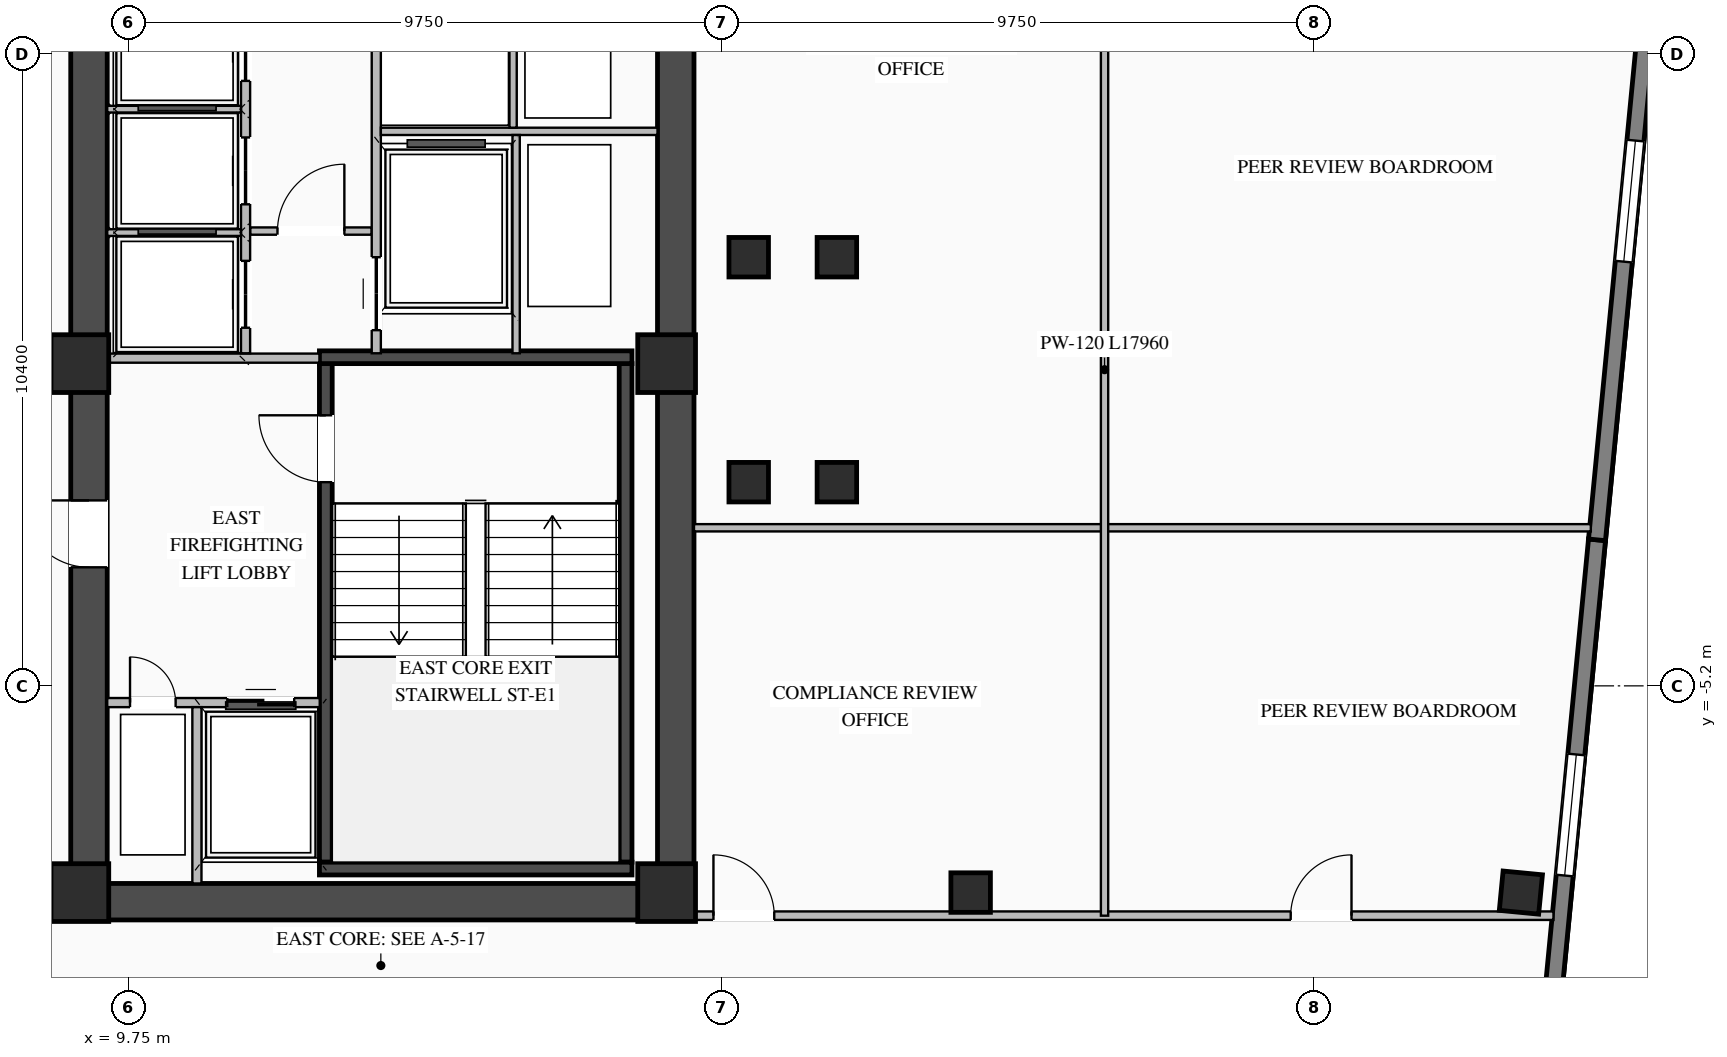
"""IFC4 building model, lengths in metres.
Left out: names, types, materials, properties, quantities, classifications, styles, units other than length and angle.
Written with IfcOpenShell. Run it as: python <this file> out.ifc"""

import sys

from ifc_helpers import new_model, si_unit, direction, frame, frame_2d, origin, origin_2d, place, context, subcontext, project, spatial, rectangle, i_section, extrude, element, fill, save


model = new_model("IFC4")
c1 = context("Model", 3, precision=1e-05, world=origin(), true_north=direction((0.0, 1.0)))
c2 = subcontext(c1, "Body", "Model", "MODEL_VIEW")
j1 = project(units=[si_unit("LENGTHUNIT", "METRE"), si_unit("PLANEANGLEUNIT", "RADIAN")], contexts=[c1])
p1 = place(None, origin())
s1 = spatial("IfcSite", under=j1, at=p1, CompositionType="ELEMENT")
p2 = place(p1, origin())
s2 = spatial("IfcBuilding", under=s1, at=p2, CompositionType="ELEMENT")
p3 = place(p2, frame((0.0, 0.0, 188.0)))
s3 = spatial("IfcBuildingStorey", under=s2, at=p3, CompositionType="ELEMENT", Elevation=188.0)
p4 = place(p3, frame((8.8, -8.75, 0.0), z_axis=(0.0, 0.0, 1.0), x_axis=(1.0, 0.0, 0.0)))
e1 = element("IfcWall", 1, at=p4, inside=s3, PredefinedType="SHEAR", context=c2, shape_type="SweptSolid", body=[
    extrude(rectangle(XDim=10.25, YDim=0.6, at=frame_2d((5.125, 0.0))), origin(), (0.0, 0.0, 1.0), 3.27),
])
p5 = place(p3, frame((9.1, -8.45, 0.0), z_axis=(0.0, 0.0, 1.0), x_axis=(0.0, 1.0, 0.0)))
e2 = element("IfcWall", 2, at=p5, inside=s3, PredefinedType="SHEAR", context=c2, shape_type="SweptSolid", body=[
    extrude(rectangle(XDim=16.9, YDim=0.6, at=frame_2d((8.45, 0.0))), origin(), (0.0, 0.0, 1.0), 3.27),
])
p6 = place(p5, frame((5.2, 0.0, 0.0)))
e3 = element("IfcOpeningElement", 3, at=p6, cuts=e2, PredefinedType="OPENING", context=c2, shape_type="SweptSolid", body=[
    extrude(rectangle(XDim=1.1, YDim=2.08, at=frame_2d((0.55, 1.04))), frame((0.0, 0.31, 0.0), z_axis=(0.0, -1.0, 0.0), x_axis=(1.0, 0.0, 0.0)), (0.0, 0.0, 1.0), 0.62),
])
p7 = place(p3, frame((18.75, -8.45, 0.0), z_axis=(0.0, 0.0, 1.0), x_axis=(0.0, 1.0, 0.0)))
e4 = element("IfcWall", 4, at=p7, inside=s3, PredefinedType="SHEAR", context=c2, shape_type="SweptSolid", body=[
    extrude(rectangle(XDim=16.9, YDim=0.6, at=frame_2d((8.45, 0.0))), origin(), (0.0, 0.0, 1.0), 3.27),
])
p8 = place(p3, frame((12.995, -8.1, 0.0), z_axis=(0.0, 0.0, 1.0), x_axis=(0.0, 1.0, 0.0)))
e5 = element("IfcWall", 5, at=p8, inside=s3, PredefinedType="SHEAR", context=c2, shape_type="SweptSolid", body=[
    extrude(rectangle(XDim=8.2, YDim=0.21, at=frame_2d((4.1, 0.0))), origin(), (0.0, 0.0, 1.0), 3.27),
])
p9 = place(p8, frame((6.25, 0.0, 0.0)))
e6 = element("IfcOpeningElement", 6, at=p9, cuts=e5, PredefinedType="OPENING", context=c2, shape_type="SweptSolid", body=[
    extrude(rectangle(XDim=1.1, YDim=2.15, at=frame_2d((0.55, 1.075))), frame((0.0, 0.115, 0.0), z_axis=(0.0, -1.0, 0.0), x_axis=(1.0, 0.0, 0.0)), (0.0, 0.0, 1.0), 0.23),
])
p10 = place(p3, frame((17.925, -8.1, 0.0), z_axis=(0.0, 0.0, 1.0), x_axis=(0.0, 1.0, 0.0)))
e7 = element("IfcWall", 7, at=p10, inside=s3, PredefinedType="SHEAR", context=c2, shape_type="SweptSolid", body=[
    extrude(rectangle(XDim=8.2, YDim=0.21, at=frame_2d((4.1, 0.0))), origin(), (0.0, 0.0, 1.0), 3.27),
])
for number, where, z_axis, x_axis in (
    (8, (12.89, -8.205, 0.0), (0.0, 0.0, 1.0), (1.0, 0.0, 0.0)),
    (9, (18.03, 0.205, 0.0), (0.0, 0.0, 1.0), (-1.0, 0.0, 0.0)),
):
    element("IfcWall", number, at=place(p3, frame(where, z_axis=z_axis, x_axis=x_axis)), inside=s3, PredefinedType="SHEAR", context=c2, shape_type="SweptSolid", body=[
        extrude(rectangle(XDim=5.14, YDim=0.21, at=frame_2d((2.57, 0.0))), origin(), (0.0, 0.0, 1.0), 3.27),
    ])
for number, where, z_axis, x_axis in (
    (10, (8.95, -8.6, 0.0), (0.0, 0.0, 1.0), (1.0, 0.0, 0.0)),
    (11, (8.95, 0.1, 0.0), (0.0, 0.0, 1.0), (1.0, 0.0, 0.0)),
    (12, (18.6, -8.6, 0.0), (0.0, 0.0, 1.0), (1.0, 0.0, 0.0)),
    (13, (18.6, 0.1, 0.0), (0.0, 0.0, 1.0), (1.0, 0.0, 0.0)),
):
    element("IfcColumn", number, at=place(p3, frame(where, z_axis=z_axis, x_axis=x_axis)), inside=s3, PredefinedType="COLUMN", context=c2, shape_type="SweptSolid", body=[
        extrude(rectangle(XDim=0.95, YDim=0.95, at=origin_2d()), origin(), (0.0, 0.0, 1.0), 3.45),
    ])
for number, where, z_axis, x_axis in (
    (14, (19.95, -1.85, 0.0), (0.0, 0.0, 1.0), (1.0, 0.0, 0.0)),
    (15, (19.95, 1.85, 0.0), (0.0, 0.0, 1.0), (1.0, 0.0, 0.0)),
    (16, (21.4, -1.85, 0.0), (0.0, 0.0, 1.0), (1.0, 0.0, 0.0)),
    (17, (21.4, 1.85, 0.0), (0.0, 0.0, 1.0), (1.0, 0.0, 0.0)),
    (18, (23.6, -8.6, 0.0), (0.0, 0.0, 1.0), (1.0, 0.0, 0.0)),
    (19, (32.649, -8.6, 0.0), (0.0, 0.0, 1.0), (0.995, -0.096, 0.0)),
):
    element("IfcColumn", number, at=place(p3, frame(where, z_axis=z_axis, x_axis=x_axis)), inside=s3, PredefinedType="COLUMN", context=c2, shape_type="SweptSolid", body=[
        extrude(i_section(OverallWidth=0.65, OverallDepth=0.65, WebThickness=0.028, FlangeThickness=0.04, at=origin_2d()), origin(), (0.0, 0.0, 1.0), 3.45),
    ])
p11 = place(p3, frame((33.901, -2.798, 0.0), z_axis=(0.0, 0.0, 1.0), x_axis=(-0.095853434568, -0.99539545864, 0.0)))
e20 = element("IfcWall", 20, at=p11, inside=s3, PredefinedType="STANDARD", context=c2, shape_type="SweptSolid", body=[
    extrude(rectangle(XDim=16.79, YDim=0.28, at=frame_2d((8.395, 0.0))), origin(), (0.0, 0.0, 1.0), 3.25),
])
p12 = place(p11, frame((3.547, 0.0, 0.76)))
e21 = element("IfcOpeningElement", 21, at=p12, cuts=e20, PredefinedType="OPENING", context=c2, shape_type="SweptSolid", body=[
    extrude(rectangle(XDim=2.0, YDim=2.05, at=frame_2d((1.0, 1.025))), frame((0.0, 0.15, 0.0), z_axis=(0.0, -1.0, 0.0), x_axis=(1.0, 0.0, 0.0)), (0.0, 0.0, 1.0), 0.3),
])
p13 = place(p11, frame((10.193, 0.0, 0.76)))
e22 = element("IfcOpeningElement", 22, at=p13, cuts=e20, PredefinedType="OPENING", context=c2, shape_type="SweptSolid", body=[
    extrude(rectangle(XDim=2.0, YDim=2.05, at=frame_2d((1.0, 1.025))), frame((0.0, 0.15, 0.0), z_axis=(0.0, -1.0, 0.0), x_axis=(1.0, 0.0, 0.0)), (0.0, 0.0, 1.0), 0.3),
])
p14 = place(p3, frame((35.51, 13.914, 0.0), z_axis=(0.0, 0.0, 1.0), x_axis=(-0.095839027265, -0.995396845913, 0.0)))
e23 = element("IfcWall", 23, at=p14, inside=s3, PredefinedType="STANDARD", context=c2, shape_type="SweptSolid", body=[
    extrude(rectangle(XDim=16.79, YDim=0.28, at=frame_2d((8.395, 0.0))), origin(), (0.0, 0.0, 1.0), 3.25),
])
p15 = place(p14, frame((5.647, 0.0, 0.76)))
e24 = element("IfcOpeningElement", 24, at=p15, cuts=e23, PredefinedType="OPENING", context=c2, shape_type="SweptSolid", body=[
    extrude(rectangle(XDim=2.0, YDim=2.05, at=frame_2d((1.0, 1.025))), frame((0.0, 0.15, 0.0), z_axis=(0.0, -1.0, 0.0), x_axis=(1.0, 0.0, 0.0)), (0.0, 0.0, 1.0), 0.3),
])
p16 = place(p14, frame((10.193, 0.0, 0.76)))
e25 = element("IfcOpeningElement", 25, at=p16, cuts=e23, PredefinedType="OPENING", context=c2, shape_type="SweptSolid", body=[
    extrude(rectangle(XDim=2.0, YDim=2.05, at=frame_2d((1.0, 1.025))), frame((0.0, 0.15, 0.0), z_axis=(0.0, -1.0, 0.0), x_axis=(1.0, 0.0, 0.0)), (0.0, 0.0, 1.0), 0.3),
])
p17 = place(p3, frame((9.4, -5.475, 0.0), z_axis=(0.0, 0.0, 1.0), x_axis=(1.0, 0.0, 0.0)))
e26 = element("IfcWall", 26, at=p17, inside=s3, PredefinedType="STANDARD", context=c2, shape_type="SweptSolid", body=[
    extrude(rectangle(XDim=3.495, YDim=0.15, at=frame_2d((1.748, 0.0))), origin(), (0.0, 0.0, 1.0), 3.25),
])
p18 = place(p17, frame((1.975, 0.0, 0.0)))
e27 = element("IfcOpeningElement", 27, at=p18, cuts=e26, PredefinedType="OPENING", context=c2, shape_type="SweptSolid", body=[
    extrude(rectangle(XDim=1.1, YDim=2.15, at=frame_2d((0.55, 1.075))), frame((0.0, 0.085, 0.0), z_axis=(0.0, -1.0, 0.0), x_axis=(1.0, 0.0, 0.0)), (0.0, 0.0, 1.0), 0.17),
])
p19 = place(p17, frame((0.375, 0.0, 0.0)))
e28 = element("IfcOpeningElement", 28, at=p19, cuts=e26, PredefinedType="OPENING", context=c2, shape_type="SweptSolid", body=[
    extrude(rectangle(XDim=0.75, YDim=2.05, at=frame_2d((0.375, 1.025))), frame((0.0, 0.085, 0.0), z_axis=(0.0, -1.0, 0.0), x_axis=(1.0, 0.0, 0.0)), (0.0, 0.0, 1.0), 0.17),
])
p20 = place(p3, frame((10.875, -8.45, 0.0), z_axis=(0.0, 0.0, 1.0), x_axis=(0.0, 1.0, 0.0)))
e29 = element("IfcWall", 29, at=p20, inside=s3, PredefinedType="STANDARD", context=c2, shape_type="SweptSolid", body=[
    extrude(rectangle(XDim=2.9, YDim=0.15, at=frame_2d((1.45, 0.0))), origin(), (0.0, 0.0, 1.0), 3.25),
])
p21 = place(p3, frame((9.4, 0.19, 0.0), z_axis=(0.0, 0.0, 1.0), x_axis=(1.0, 0.0, 0.0)))
e30 = element("IfcWall", 30, at=p21, inside=s3, PredefinedType="STANDARD", context=c2, shape_type="SweptSolid", body=[
    extrude(rectangle(XDim=3.49, YDim=0.15, at=frame_2d((1.745, 0.0))), origin(), (0.0, 0.0, 1.0), 2.645),
])
p22 = place(p3, frame((11.75, 2.28, 0.0), z_axis=(0.0, 0.0, 1.0), x_axis=(1.0, 0.0, 0.0)))
e31 = element("IfcWall", 31, at=p22, inside=s3, PredefinedType="STANDARD", context=c2, shape_type="SweptSolid", body=[
    extrude(rectangle(XDim=2.0, YDim=0.12, at=frame_2d((1.0, 0.0))), origin(), (0.0, 0.0, 1.0), 3.25),
])
p23 = place(p22, frame((0.45, 0.0, 0.0)))
e32 = element("IfcOpeningElement", 32, at=p23, cuts=e31, PredefinedType="OPENING", context=c2, shape_type="SweptSolid", body=[
    extrude(rectangle(XDim=1.1, YDim=2.1, at=frame_2d((0.55, 1.05))), frame((0.0, 0.07, 0.0), z_axis=(0.0, -1.0, 0.0), x_axis=(1.0, 0.0, 0.0)), (0.0, 0.0, 1.0), 0.14),
])
p24 = place(p3, frame((11.675, 0.27, 0.0), z_axis=(0.0, 0.0, 1.0), x_axis=(0.0, 1.0, 0.0)))
e33 = element("IfcWall", 33, at=p24, inside=s3, PredefinedType="STANDARD", context=c2, shape_type="SweptSolid", body=[
    extrude(rectangle(XDim=8.18, YDim=0.15, at=frame_2d((4.09, 0.0))), origin(), (0.0, 0.0, 1.0), 3.25),
])
p25 = place(p24, frame((0.42, 0.0, 0.0)))
e34 = element("IfcOpeningElement", 34, at=p25, cuts=e33, PredefinedType="OPENING", context=c2, shape_type="SweptSolid", body=[
    extrude(rectangle(XDim=1.1, YDim=2.1, at=frame_2d((0.55, 1.05))), frame((0.0, 0.085, 0.0), z_axis=(0.0, -1.0, 0.0), x_axis=(1.0, 0.0, 0.0)), (0.0, 0.0, 1.0), 0.17),
])
p26 = place(p24, frame((2.45, 0.0, 0.0)))
e35 = element("IfcOpeningElement", 35, at=p26, cuts=e33, PredefinedType="OPENING", context=c2, shape_type="SweptSolid", body=[
    extrude(rectangle(XDim=1.1, YDim=2.1, at=frame_2d((0.55, 1.05))), frame((0.0, 0.085, 0.0), z_axis=(0.0, -1.0, 0.0), x_axis=(1.0, 0.0, 0.0)), (0.0, 0.0, 1.0), 0.17),
])
p27 = place(p24, frame((4.48, 0.0, 0.0)))
e36 = element("IfcOpeningElement", 36, at=p27, cuts=e33, PredefinedType="OPENING", context=c2, shape_type="SweptSolid", body=[
    extrude(rectangle(XDim=1.1, YDim=2.1, at=frame_2d((0.55, 1.05))), frame((0.0, 0.085, 0.0), z_axis=(0.0, -1.0, 0.0), x_axis=(1.0, 0.0, 0.0)), (0.0, 0.0, 1.0), 0.17),
])
p28 = place(p24, frame((6.51, 0.0, 0.0)))
e37 = element("IfcOpeningElement", 37, at=p28, cuts=e33, PredefinedType="OPENING", context=c2, shape_type="SweptSolid", body=[
    extrude(rectangle(XDim=1.1, YDim=2.1, at=frame_2d((0.55, 1.05))), frame((0.0, 0.085, 0.0), z_axis=(0.0, -1.0, 0.0), x_axis=(1.0, 0.0, 0.0)), (0.0, 0.0, 1.0), 0.17),
])
for number, where, z_axis, x_axis in (
    (38, (9.4, 2.255, 0.0), (0.0, 0.0, 1.0), (1.0, 0.0, 0.0)),
    (39, (9.4, 4.285, 0.0), (0.0, 0.0, 1.0), (1.0, 0.0, 0.0)),
):
    element("IfcWall", number, at=place(p3, frame(where, z_axis=z_axis, x_axis=x_axis)), inside=s3, PredefinedType="STANDARD", context=c2, shape_type="SweptSolid", body=[
        extrude(rectangle(XDim=2.2, YDim=0.11, at=frame_2d((1.1, 0.0))), origin(), (0.0, 0.0, 1.0), 3.25),
    ])
p29 = place(p3, frame((13.825, 0.27, 0.0), z_axis=(0.0, 0.0, 1.0), x_axis=(0.0, 1.0, 0.0)))
e40 = element("IfcWall", 40, at=p29, inside=s3, PredefinedType="STANDARD", context=c2, shape_type="SweptSolid", body=[
    extrude(rectangle(XDim=8.18, YDim=0.15, at=frame_2d((4.09, 0.0))), origin(), (0.0, 0.0, 1.0), 3.25),
])
p30 = place(p29, frame((0.38, 0.0, 0.0)))
e41 = element("IfcOpeningElement", 41, at=p30, cuts=e40, PredefinedType="OPENING", context=c2, shape_type="SweptSolid", body=[
    extrude(rectangle(XDim=1.2, YDim=2.1, at=frame_2d((0.6, 1.05))), frame((0.0, 0.085, 0.0), z_axis=(0.0, -1.0, 0.0), x_axis=(1.0, 0.0, 0.0)), (0.0, 0.0, 1.0), 0.17),
])
p31 = place(p3, frame((13.9, 3.92, 0.0), z_axis=(0.0, 0.0, 1.0), x_axis=(1.0, 0.0, 0.0)))
e42 = element("IfcWall", 42, at=p31, inside=s3, PredefinedType="STANDARD", context=c2, shape_type="SweptSolid", body=[
    extrude(rectangle(XDim=4.55, YDim=0.12, at=frame_2d((2.275, 0.0))), origin(), (0.0, 0.0, 1.0), 3.25),
])
p32 = place(p3, frame((16.075, 3.98, 0.0), z_axis=(0.0, 0.0, 1.0), x_axis=(0.0, 1.0, 0.0)))
e43 = element("IfcWall", 43, at=p32, inside=s3, PredefinedType="STANDARD", context=c2, shape_type="SweptSolid", body=[
    extrude(rectangle(XDim=4.47, YDim=0.12, at=frame_2d((2.235, 0.0))), origin(), (0.0, 0.0, 1.0), 3.25),
])
p33 = place(p3, frame((16.125, 0.27, 0.0), z_axis=(0.0, 0.0, 1.0), x_axis=(0.0, 1.0, 0.0)))
e44 = element("IfcWall", 44, at=p33, inside=s3, PredefinedType="STANDARD", context=c2, shape_type="SweptSolid", body=[
    extrude(rectangle(XDim=3.59, YDim=0.12, at=frame_2d((1.795, 0.0))), origin(), (0.0, 0.0, 1.0), 3.25),
])
p34 = place(p3, frame((19.05, -8.98, 0.0), z_axis=(0.0, 0.0, 1.0), x_axis=(1.0, 0.0, 0.0)))
e45 = element("IfcWall", 45, at=p34, inside=s3, PredefinedType="STANDARD", context=c2, shape_type="SweptSolid", body=[
    extrude(rectangle(XDim=14.135, YDim=0.14, at=frame_2d((7.067, 0.0))), origin(), (0.0, 0.0, 1.0), 3.25),
])
p35 = place(p34, frame((0.32, 0.0, 0.0)))
e46 = element("IfcOpeningElement", 46, at=p35, cuts=e45, PredefinedType="OPENING", context=c2, shape_type="SweptSolid", body=[
    extrude(rectangle(XDim=1.0, YDim=2.08, at=frame_2d((0.5, 1.04))), frame((0.0, 0.08, 0.0), z_axis=(0.0, -1.0, 0.0), x_axis=(1.0, 0.0, 0.0)), (0.0, 0.0, 1.0), 0.16),
])
p36 = place(p34, frame((9.813, 0.0, 0.0)))
e47 = element("IfcOpeningElement", 47, at=p36, cuts=e45, PredefinedType="OPENING", context=c2, shape_type="SweptSolid", body=[
    extrude(rectangle(XDim=1.0, YDim=2.08, at=frame_2d((0.5, 1.04))), frame((0.0, 0.08, 0.0), z_axis=(0.0, -1.0, 0.0), x_axis=(1.0, 0.0, 0.0)), (0.0, 0.0, 1.0), 0.16),
])
p37 = place(p3, frame((19.05, -2.6, 0.0), z_axis=(0.0, 0.0, 1.0), x_axis=(1.0, 0.0, 0.0)))
e48 = element("IfcWall", 48, at=p37, inside=s3, PredefinedType="STANDARD", context=c2, shape_type="SweptSolid", body=[
    extrude(rectangle(XDim=14.749, YDim=0.12, at=frame_2d((7.375, 0.0))), origin(), (0.0, 0.0, 1.0), 3.25),
])
p38 = place(p3, frame((25.802, -8.98, 0.0), z_axis=(0.0, 0.0, 1.0), x_axis=(0.0, 1.0, 0.0)))
e49 = element("IfcWall", 49, at=p38, inside=s3, PredefinedType="STANDARD", context=c2, shape_type="SweptSolid", body=[
    extrude(rectangle(XDim=17.96, YDim=0.12, at=frame_2d((8.98, 0.0))), origin(), (0.0, 0.0, 1.0), 3.25),
])
p39 = place(p12, origin())
e50 = element("IfcWindow", 50, at=p39, inside=s3, PartitioningType="DOUBLE_PANEL_VERTICAL", PredefinedType="WINDOW", context=c2, shape_type="SweptSolid", body=[
    extrude(rectangle(XDim=2.0, YDim=2.05, at=frame_2d((1.0, 1.025))), frame((0.0, 0.03, 0.0), z_axis=(0.0, -1.0, 0.0), x_axis=(1.0, 0.0, 0.0)), (0.0, 0.0, 1.0), 0.06),
])
fill(e21, e50)
p40 = place(p16, origin())
e51 = element("IfcWindow", 51, at=p40, inside=s3, PartitioningType="DOUBLE_PANEL_VERTICAL", PredefinedType="WINDOW", context=c2, shape_type="SweptSolid", body=[
    extrude(rectangle(XDim=2.0, YDim=2.05, at=frame_2d((1.0, 1.025))), frame((0.0, 0.03, 0.0), z_axis=(0.0, -1.0, 0.0), x_axis=(1.0, 0.0, 0.0)), (0.0, 0.0, 1.0), 0.06),
])
fill(e25, e51)
p41 = place(p9, origin())
e52 = element("IfcDoor", 52, at=p41, inside=s3, OperationType="SINGLE_SWING_RIGHT", PredefinedType="DOOR", context=c2, shape_type="SweptSolid", body=[
    extrude(rectangle(XDim=1.1, YDim=2.15, at=frame_2d((0.55, 1.075))), frame((0.0, 0.025, 0.0), z_axis=(0.0, -1.0, 0.0), x_axis=(1.0, 0.0, 0.0)), (0.0, 0.0, 1.0), 0.05),
])
fill(e6, e52)
p42 = place(p18, origin())
e53 = element("IfcDoor", 53, at=p42, inside=s3, OperationType="DOUBLE_DOOR_SLIDING", PredefinedType="DOOR", context=c2, shape_type="SweptSolid", body=[
    extrude(rectangle(XDim=1.1, YDim=2.15, at=frame_2d((0.55, 1.075))), frame((0.0, 0.025, 0.0), z_axis=(0.0, -1.0, 0.0), x_axis=(1.0, 0.0, 0.0)), (0.0, 0.0, 1.0), 0.05),
])
fill(e27, e53)
p43 = place(p19, origin())
e54 = element("IfcDoor", 54, at=p43, inside=s3, OperationType="SINGLE_SWING_LEFT", PredefinedType="DOOR", context=c2, shape_type="SweptSolid", body=[
    extrude(rectangle(XDim=0.75, YDim=2.05, at=frame_2d((0.375, 1.025))), frame((0.0, 0.025, 0.0), z_axis=(0.0, -1.0, 0.0), x_axis=(1.0, 0.0, 0.0)), (0.0, 0.0, 1.0), 0.05),
])
fill(e28, e54)
p44 = place(p6, origin())
e55 = element("IfcDoor", 55, at=p44, inside=s3, OperationType="SINGLE_SWING_RIGHT", PredefinedType="DOOR", context=c2, shape_type="SweptSolid", body=[
    extrude(rectangle(XDim=1.1, YDim=2.08, at=frame_2d((0.55, 1.04))), frame((0.0, -0.205, 0.0), z_axis=(0.0, -1.0, 0.0), x_axis=(1.0, 0.0, 0.0)), (0.0, 0.0, 1.0), 0.05),
])
fill(e3, e55)
p45 = place(p23, origin())
e56 = element("IfcDoor", 56, at=p45, inside=s3, OperationType="SINGLE_SWING_RIGHT", PredefinedType="DOOR", context=c2, shape_type="SweptSolid", body=[
    extrude(rectangle(XDim=1.1, YDim=2.1, at=frame_2d((0.55, 1.05))), frame((0.0, 0.025, 0.0), z_axis=(0.0, -1.0, 0.0), x_axis=(1.0, 0.0, 0.0)), (0.0, 0.0, 1.0), 0.05),
])
fill(e32, e56)
p46 = place(p25, origin())
e57 = element("IfcDoor", 57, at=p46, inside=s3, OperationType="DOUBLE_DOOR_SLIDING", PredefinedType="DOOR", context=c2, shape_type="SweptSolid", body=[
    extrude(rectangle(XDim=1.1, YDim=2.1, at=frame_2d((0.55, 1.05))), frame((0.0, 0.025, 0.0), z_axis=(0.0, -1.0, 0.0), x_axis=(1.0, 0.0, 0.0)), (0.0, 0.0, 1.0), 0.05),
])
fill(e34, e57)
p47 = place(p26, origin())
e58 = element("IfcDoor", 58, at=p47, inside=s3, OperationType="DOUBLE_DOOR_SLIDING", PredefinedType="DOOR", context=c2, shape_type="SweptSolid", body=[
    extrude(rectangle(XDim=1.1, YDim=2.1, at=frame_2d((0.55, 1.05))), frame((0.0, 0.025, 0.0), z_axis=(0.0, -1.0, 0.0), x_axis=(1.0, 0.0, 0.0)), (0.0, 0.0, 1.0), 0.05),
])
fill(e35, e58)
p48 = place(p27, origin())
e59 = element("IfcDoor", 59, at=p48, inside=s3, OperationType="DOUBLE_DOOR_SLIDING", PredefinedType="DOOR", context=c2, shape_type="SweptSolid", body=[
    extrude(rectangle(XDim=1.1, YDim=2.1, at=frame_2d((0.55, 1.05))), frame((0.0, 0.025, 0.0), z_axis=(0.0, -1.0, 0.0), x_axis=(1.0, 0.0, 0.0)), (0.0, 0.0, 1.0), 0.05),
])
fill(e36, e59)
p49 = place(p30, origin())
e60 = element("IfcDoor", 60, at=p49, inside=s3, OperationType="DOUBLE_DOOR_SLIDING", PredefinedType="DOOR", context=c2, shape_type="SweptSolid", body=[
    extrude(rectangle(XDim=1.2, YDim=2.1, at=frame_2d((0.6, 1.05))), frame((0.0, 0.025, 0.0), z_axis=(0.0, -1.0, 0.0), x_axis=(1.0, 0.0, 0.0)), (0.0, 0.0, 1.0), 0.05),
])
fill(e41, e60)
p50 = place(p35, origin())
e61 = element("IfcDoor", 61, at=p50, inside=s3, OperationType="SINGLE_SWING_LEFT", PredefinedType="DOOR", context=c2, shape_type="SweptSolid", body=[
    extrude(rectangle(XDim=1.0, YDim=2.08, at=frame_2d((0.5, 1.04))), frame((0.0, 0.025, 0.0), z_axis=(0.0, -1.0, 0.0), x_axis=(1.0, 0.0, 0.0)), (0.0, 0.0, 1.0), 0.05),
])
fill(e46, e61)
p51 = place(p36, origin())
e62 = element("IfcDoor", 62, at=p51, inside=s3, OperationType="SINGLE_SWING_RIGHT", PredefinedType="DOOR", context=c2, shape_type="SweptSolid", body=[
    extrude(rectangle(XDim=1.0, YDim=2.08, at=frame_2d((0.5, 1.04))), frame((0.0, 0.025, 0.0), z_axis=(0.0, -1.0, 0.0), x_axis=(1.0, 0.0, 0.0)), (0.0, 0.0, 1.0), 0.05),
])
fill(e47, e62)
save(model, sys.argv[1])
